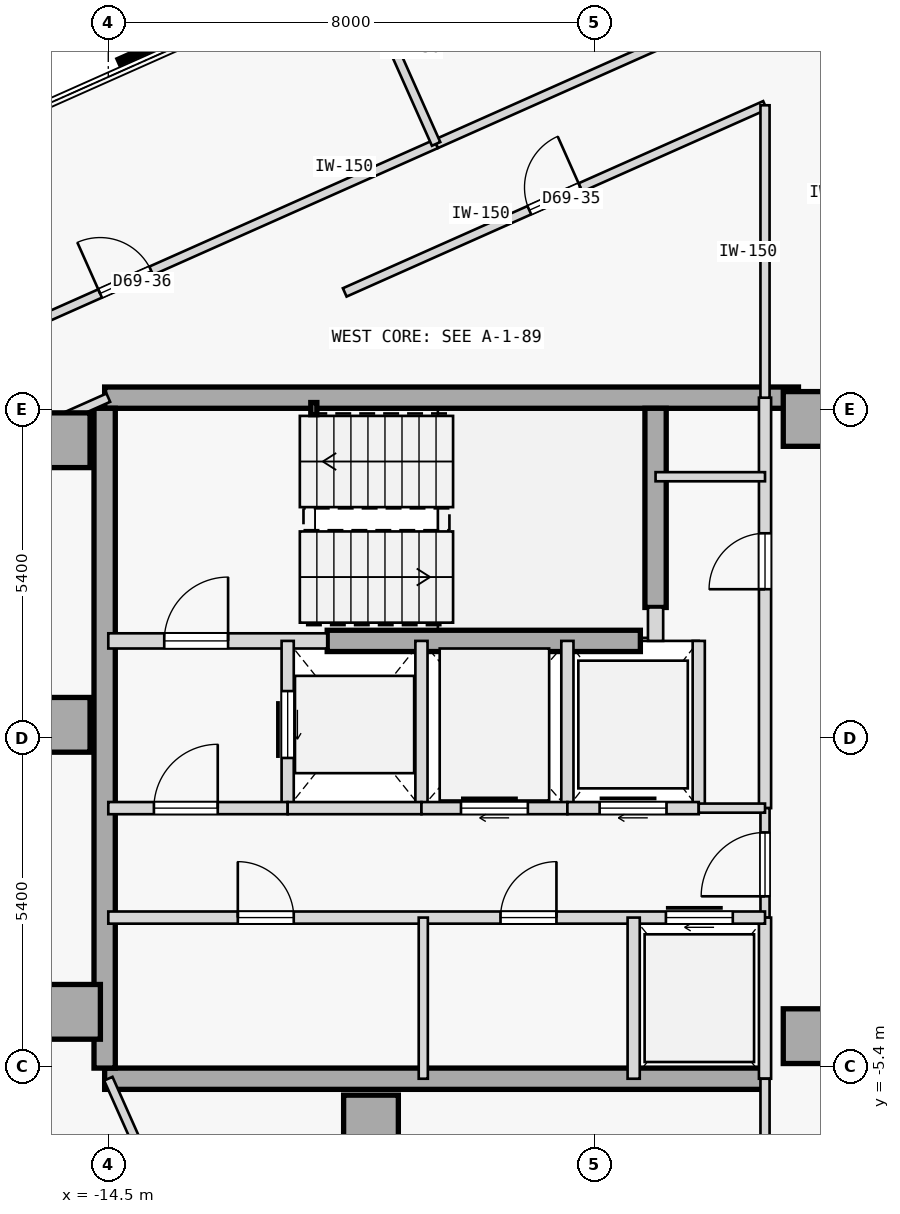
"""IFC4 building model, lengths in metres.
Left out: names, types, materials, properties, quantities, classifications, styles, units other than length and angle.
Written with IfcOpenShell. Run it as: python <this file> out.ifc"""

import sys

from ifc_helpers import new_model, si_unit, direction, frame, frame_2d, origin, origin_2d, place, context, subcontext, project, spatial, rectangle, hollow_rectangle, extrude, element, fill, save


model = new_model("IFC4")
c1 = context("Model", 3, precision=1e-05, world=origin(), true_north=direction((0.0, 1.0)))
c2 = subcontext(c1, "Body", "Model", "MODEL_VIEW")
j1 = project(units=[si_unit("LENGTHUNIT", "METRE"), si_unit("PLANEANGLEUNIT", "RADIAN")], contexts=[c1])
p1 = place(None, origin())
s1 = spatial("IfcSite", under=j1, at=p1, CompositionType="ELEMENT")
p2 = place(p1, origin())
s2 = spatial("IfcBuilding", under=s1, at=p2, CompositionType="ELEMENT")
p3 = place(p2, frame((0.0, 0.0, 258.85)))
s3 = spatial("IfcBuildingStorey", under=s2, at=p3, CompositionType="ELEMENT", Elevation=258.85)
for number, where, z_axis, x_axis in (
    (1, (-15.25, 4.9, 0.0), (0.0, 0.0, 1.0), (1.0, 0.0, 0.0)),
    (2, (-15.25, 0.22, 0.0), (0.0, 0.0, 1.0), (1.0, 0.0, 0.0)),
    (3, (-15.08, -4.5, 0.0), (0.0, 0.0, 1.0), (1.0, 0.0, 0.0)),
    (4, (-10.18, -6.32, 0.0), (0.0, 0.0, 1.0), (1.0, 0.0, 0.0)),
    (5, (-2.95, -4.9, 0.0), (0.0, 0.0, 1.0), (1.0, 0.0, 0.0)),
    (6, (-2.95, 5.25, 0.0), (0.0, 0.0, 1.0), (1.0, 0.0, 0.0)),
):
    element("IfcColumn", number, at=place(p3, frame(where, z_axis=z_axis, x_axis=x_axis)), inside=s3, PredefinedType="COLUMN", context=c2, shape_type="SweptSolid", body=[
        extrude(rectangle(XDim=0.9, YDim=0.9, at=origin_2d()), origin(), (0.0, 0.0, 1.0), 3.35),
    ])
p4 = place(p3, frame((-14.56, 5.6, 0.0), z_axis=(0.0, 0.0, 1.0), x_axis=(1.0, 0.0, 0.0)))
e7 = element("IfcWall", 7, at=p4, inside=s3, PredefinedType="SHEAR", context=c2, shape_type="SweptSolid", body=[
    extrude(rectangle(XDim=11.41, YDim=0.35, at=frame_2d((5.705, 0.0))), origin(), (0.0, 0.0, 1.0), 3.125),
])
p5 = place(p3, frame((-14.56, -5.6, 0.0), z_axis=(0.0, 0.0, 1.0), x_axis=(1.0, 0.0, 0.0)))
e8 = element("IfcWall", 8, at=p5, inside=s3, PredefinedType="SHEAR", context=c2, shape_type="SweptSolid", body=[
    extrude(rectangle(XDim=10.86, YDim=0.35, at=frame_2d((5.43, 0.0))), origin(), (0.0, 0.0, 1.0), 3.125),
])
p6 = place(p3, frame((-14.56, -5.425, 0.0), z_axis=(0.0, 0.0, 1.0), x_axis=(0.0, 1.0, 0.0)))
e9 = element("IfcWall", 9, at=p6, inside=s3, PredefinedType="SHEAR", context=c2, shape_type="SweptSolid", body=[
    extrude(rectangle(XDim=10.85, YDim=0.35, at=frame_2d((5.425, 0.0))), origin(), (0.0, 0.0, 1.0), 3.125),
])
p7 = place(p3, frame((-5.5, 2.15, 0.0), z_axis=(0.0, 0.0, 1.0), x_axis=(0.0, 1.0, 0.0)))
e10 = element("IfcWall", 10, at=p7, inside=s3, PredefinedType="SHEAR", context=c2, shape_type="SweptSolid", body=[
    extrude(rectangle(XDim=3.275, YDim=0.35, at=frame_2d((1.638, 0.0))), origin(), (0.0, 0.0, 1.0), 3.125),
])
p8 = place(p3, frame((-10.9, 1.6, 0.0), z_axis=(0.0, 0.0, 1.0), x_axis=(1.0, 0.0, 0.0)))
e11 = element("IfcWall", 11, at=p8, inside=s3, PredefinedType="SHEAR", context=c2, shape_type="SweptSolid", body=[
    extrude(rectangle(XDim=5.15, YDim=0.35, at=frame_2d((2.575, 0.0))), origin(), (0.0, 0.0, 1.0), 3.125),
])
p9 = place(p3, frame((-11.12, 5.42, 0.0), z_axis=(0.0, 0.0, 1.0), x_axis=(1.0, 0.0, 0.0)))
e12 = element("IfcColumn", 12, at=p9, inside=s3, PredefinedType="COLUMN", context=c2, shape_type="SweptSolid", body=[
    extrude(hollow_rectangle(XDim=0.1, YDim=0.2, WallThickness=0.008, at=origin_2d()), origin(), (0.0, 0.0, 1.0), 3.35),
])
p10 = place(p3, frame((-14.5, 1.6, 0.0), z_axis=(0.0, 0.0, 1.0), x_axis=(1.0, 0.0, 0.0)))
e13 = element("IfcWall", 13, at=p10, inside=s3, PredefinedType="STANDARD", context=c2, shape_type="SweptSolid", body=[
    extrude(rectangle(XDim=3.6, YDim=0.25, at=frame_2d((1.8, 0.0))), origin(), (0.0, 0.0, 1.0), 3.125),
])
p11 = place(p10, frame((0.92, 0.0, 0.0)))
e14 = element("IfcOpeningElement", 14, at=p11, cuts=e13, PredefinedType="OPENING", context=c2, shape_type="SweptSolid", body=[
    extrude(rectangle(XDim=1.05, YDim=2.15, at=frame_2d((0.525, 1.075))), frame((0.0, 0.135, 0.0), z_axis=(0.0, -1.0, 0.0), x_axis=(1.0, 0.0, 0.0)), (0.0, 0.0, 1.0), 0.27),
])
p12 = place(p3, frame((-5.5, 1.6, 0.0), z_axis=(0.0, 0.0, 1.0), x_axis=(0.0, 1.0, 0.0)))
e15 = element("IfcWall", 15, at=p12, inside=s3, PredefinedType="STANDARD", context=c2, shape_type="SweptSolid", body=[
    extrude(rectangle(XDim=0.55, YDim=0.25, at=frame_2d((0.275, 0.0))), origin(), (0.0, 0.0, 1.0), 3.125),
])
p13 = place(p3, frame((-3.7, -1.15, 0.0), z_axis=(0.0, 0.0, 1.0), x_axis=(0.0, 1.0, 0.0)))
e16 = element("IfcWall", 16, at=p13, inside=s3, PredefinedType="STANDARD", context=c2, shape_type="SweptSolid", body=[
    extrude(rectangle(XDim=6.75, YDim=0.2, at=frame_2d((3.375, 0.0))), origin(), (0.0, 0.0, 1.0), 3.125),
])
p14 = place(p13, frame((3.6, 0.0, 0.0)))
e17 = element("IfcOpeningElement", 17, at=p14, cuts=e16, PredefinedType="OPENING", context=c2, shape_type="SweptSolid", body=[
    extrude(rectangle(XDim=0.92, YDim=2.15, at=frame_2d((0.46, 1.075))), frame((0.0, 0.11, 0.0), z_axis=(0.0, -1.0, 0.0), x_axis=(1.0, 0.0, 0.0)), (0.0, 0.0, 1.0), 0.22),
])
p15 = place(p3, frame((-3.7, -2.95, 0.0), z_axis=(0.0, 0.0, 1.0), x_axis=(0.0, 1.0, 0.0)))
e18 = element("IfcWall", 18, at=p15, inside=s3, PredefinedType="PARTITIONING", context=c2, shape_type="SweptSolid", body=[
    extrude(rectangle(XDim=1.8, YDim=0.15, at=frame_2d((0.9, 0.0))), origin(), (0.0, 0.0, 1.0), 3.125),
])
p16 = place(p15, frame((0.35, 0.0, 0.0)))
e19 = element("IfcOpeningElement", 19, at=p16, cuts=e18, PredefinedType="OPENING", context=c2, shape_type="SweptSolid", body=[
    extrude(rectangle(XDim=1.05, YDim=2.18, at=frame_2d((0.525, 1.09))), frame((0.0, 0.085, 0.0), z_axis=(0.0, -1.0, 0.0), x_axis=(1.0, 0.0, 0.0)), (0.0, 0.0, 1.0), 0.17),
])
p17 = place(p3, frame((-3.7, -5.6, 0.0), z_axis=(0.0, 0.0, 1.0), x_axis=(0.0, 1.0, 0.0)))
e20 = element("IfcWall", 20, at=p17, inside=s3, PredefinedType="STANDARD", context=c2, shape_type="SweptSolid", body=[
    extrude(rectangle(XDim=2.65, YDim=0.2, at=frame_2d((1.325, 0.0))), origin(), (0.0, 0.0, 1.0), 3.125),
])
p18 = place(p3, frame((-11.55, -1.15, 0.0), z_axis=(0.0, 0.0, 1.0), x_axis=(0.0, 1.0, 0.0)))
e21 = element("IfcWall", 21, at=p18, inside=s3, PredefinedType="STANDARD", context=c2, shape_type="SweptSolid", body=[
    extrude(rectangle(XDim=2.75, YDim=0.2, at=frame_2d((1.375, 0.0))), origin(), (0.0, 0.0, 1.0), 3.125),
])
p19 = place(p18, frame((0.825, 0.0, 0.0)))
e22 = element("IfcOpeningElement", 22, at=p19, cuts=e21, PredefinedType="OPENING", context=c2, shape_type="SweptSolid", body=[
    extrude(rectangle(XDim=1.1, YDim=2.15, at=frame_2d((0.55, 1.075))), frame((0.0, 0.11, 0.0), z_axis=(0.0, -1.0, 0.0), x_axis=(1.0, 0.0, 0.0)), (0.0, 0.0, 1.0), 0.22),
])
p20 = place(p3, frame((-9.35, -1.15, 0.0), z_axis=(0.0, 0.0, 1.0), x_axis=(0.0, 1.0, 0.0)))
e23 = element("IfcWall", 23, at=p20, inside=s3, PredefinedType="STANDARD", context=c2, shape_type="SweptSolid", body=[
    extrude(rectangle(XDim=2.75, YDim=0.2, at=frame_2d((1.375, 0.0))), origin(), (0.0, 0.0, 1.0), 3.125),
])
p21 = place(p3, frame((-14.5, -1.15, 0.0), z_axis=(0.0, 0.0, 1.0), x_axis=(1.0, 0.0, 0.0)))
e24 = element("IfcWall", 24, at=p21, inside=s3, PredefinedType="STANDARD", context=c2, shape_type="SweptSolid", body=[
    extrude(rectangle(XDim=2.95, YDim=0.2, at=frame_2d((1.475, 0.0))), origin(), (0.0, 0.0, 1.0), 3.125),
])
p22 = place(p21, frame((0.75, 0.0, 0.0)))
e25 = element("IfcOpeningElement", 25, at=p22, cuts=e24, PredefinedType="OPENING", context=c2, shape_type="SweptSolid", body=[
    extrude(rectangle(XDim=1.05, YDim=2.18, at=frame_2d((0.525, 1.09))), frame((0.0, 0.11, 0.0), z_axis=(0.0, -1.0, 0.0), x_axis=(1.0, 0.0, 0.0)), (0.0, 0.0, 1.0), 0.22),
])
p23 = place(p3, frame((-11.55, -1.15, 0.0), z_axis=(0.0, 0.0, 1.0), x_axis=(1.0, 0.0, 0.0)))
e26 = element("IfcWall", 26, at=p23, inside=s3, PredefinedType="STANDARD", context=c2, shape_type="SweptSolid", body=[
    extrude(rectangle(XDim=2.2, YDim=0.2, at=frame_2d((1.1, 0.0))), origin(), (0.0, 0.0, 1.0), 3.125),
])
p24 = place(p3, frame((-6.95, -1.15, 0.0), z_axis=(0.0, 0.0, 1.0), x_axis=(0.0, 1.0, 0.0)))
e27 = element("IfcWall", 27, at=p24, inside=s3, PredefinedType="STANDARD", context=c2, shape_type="SweptSolid", body=[
    extrude(rectangle(XDim=2.75, YDim=0.2, at=frame_2d((1.375, 0.0))), origin(), (0.0, 0.0, 1.0), 3.125),
])
p25 = place(p3, frame((-9.35, -1.15, 0.0), z_axis=(0.0, 0.0, 1.0), x_axis=(1.0, 0.0, 0.0)))
e28 = element("IfcWall", 28, at=p25, inside=s3, PredefinedType="STANDARD", context=c2, shape_type="SweptSolid", body=[
    extrude(rectangle(XDim=2.4, YDim=0.2, at=frame_2d((1.2, 0.0))), origin(), (0.0, 0.0, 1.0), 3.125),
])
p26 = place(p25, frame((0.65, 0.0, 0.0)))
e29 = element("IfcOpeningElement", 29, at=p26, cuts=e28, PredefinedType="OPENING", context=c2, shape_type="SweptSolid", body=[
    extrude(rectangle(XDim=1.1, YDim=2.15, at=frame_2d((0.55, 1.075))), frame((0.0, 0.11, 0.0), z_axis=(0.0, -1.0, 0.0), x_axis=(1.0, 0.0, 0.0)), (0.0, 0.0, 1.0), 0.22),
])
p27 = place(p3, frame((-4.79, -1.15, 0.0), z_axis=(0.0, 0.0, 1.0), x_axis=(0.0, 1.0, 0.0)))
e30 = element("IfcWall", 30, at=p27, inside=s3, PredefinedType="STANDARD", context=c2, shape_type="SweptSolid", body=[
    extrude(rectangle(XDim=2.75, YDim=0.2, at=frame_2d((1.375, 0.0))), origin(), (0.0, 0.0, 1.0), 3.125),
])
p28 = place(p3, frame((-6.95, -1.15, 0.0), z_axis=(0.0, 0.0, 1.0), x_axis=(1.0, 0.0, 0.0)))
e31 = element("IfcWall", 31, at=p28, inside=s3, PredefinedType="STANDARD", context=c2, shape_type="SweptSolid", body=[
    extrude(rectangle(XDim=2.16, YDim=0.2, at=frame_2d((1.08, 0.0))), origin(), (0.0, 0.0, 1.0), 3.125),
])
p29 = place(p28, frame((0.53, 0.0, 0.0)))
e32 = element("IfcOpeningElement", 32, at=p29, cuts=e31, PredefinedType="OPENING", context=c2, shape_type="SweptSolid", body=[
    extrude(rectangle(XDim=1.1, YDim=2.15, at=frame_2d((0.55, 1.075))), frame((0.0, 0.11, 0.0), z_axis=(0.0, -1.0, 0.0), x_axis=(1.0, 0.0, 0.0)), (0.0, 0.0, 1.0), 0.22),
])
p30 = place(p3, frame((-4.79, -1.15, 0.0), z_axis=(0.0, 0.0, 1.0), x_axis=(1.0, 0.0, 0.0)))
e33 = element("IfcWall", 33, at=p30, inside=s3, PredefinedType="PARTITIONING", context=c2, shape_type="SweptSolid", body=[
    extrude(rectangle(XDim=1.09, YDim=0.15, at=frame_2d((0.545, 0.0))), origin(), (0.0, 0.0, 1.0), 3.125),
])
p31 = place(p3, frame((-14.5, -2.95, 0.0), z_axis=(0.0, 0.0, 1.0), x_axis=(1.0, 0.0, 0.0)))
e34 = element("IfcWall", 34, at=p31, inside=s3, PredefinedType="STANDARD", context=c2, shape_type="SweptSolid", body=[
    extrude(rectangle(XDim=10.8, YDim=0.2, at=frame_2d((5.4, 0.0))), origin(), (0.0, 0.0, 1.0), 3.125),
])
p32 = place(p31, frame((9.17, 0.0, 0.0)))
e35 = element("IfcOpeningElement", 35, at=p32, cuts=e34, PredefinedType="OPENING", context=c2, shape_type="SweptSolid", body=[
    extrude(rectangle(XDim=1.1, YDim=2.15, at=frame_2d((0.55, 1.075))), frame((0.0, 0.11, 0.0), z_axis=(0.0, -1.0, 0.0), x_axis=(1.0, 0.0, 0.0)), (0.0, 0.0, 1.0), 0.22),
])
p33 = place(p31, frame((2.13, 0.0, 0.0)))
e36 = element("IfcOpeningElement", 36, at=p33, cuts=e34, PredefinedType="OPENING", context=c2, shape_type="SweptSolid", body=[
    extrude(rectangle(XDim=0.92, YDim=2.15, at=frame_2d((0.46, 1.075))), frame((0.0, 0.11, 0.0), z_axis=(0.0, -1.0, 0.0), x_axis=(1.0, 0.0, 0.0)), (0.0, 0.0, 1.0), 0.22),
])
p34 = place(p31, frame((6.45, 0.0, 0.0)))
e37 = element("IfcOpeningElement", 37, at=p34, cuts=e34, PredefinedType="OPENING", context=c2, shape_type="SweptSolid", body=[
    extrude(rectangle(XDim=0.92, YDim=2.15, at=frame_2d((0.46, 1.075))), frame((0.0, 0.11, 0.0), z_axis=(0.0, -1.0, 0.0), x_axis=(1.0, 0.0, 0.0)), (0.0, 0.0, 1.0), 0.22),
])
p35 = place(p3, frame((-5.86, -5.6, 0.0), z_axis=(0.0, 0.0, 1.0), x_axis=(0.0, 1.0, 0.0)))
e38 = element("IfcWall", 38, at=p35, inside=s3, PredefinedType="STANDARD", context=c2, shape_type="SweptSolid", body=[
    extrude(rectangle(XDim=2.65, YDim=0.2, at=frame_2d((1.325, 0.0))), origin(), (0.0, 0.0, 1.0), 3.125),
])
p36 = place(p3, frame((-9.32, -5.6, 0.0), z_axis=(0.0, 0.0, 1.0), x_axis=(0.0, 1.0, 0.0)))
e39 = element("IfcWall", 39, at=p36, inside=s3, PredefinedType="PARTITIONING", context=c2, shape_type="SweptSolid", body=[
    extrude(rectangle(XDim=2.65, YDim=0.15, at=frame_2d((1.325, 0.0))), origin(), (0.0, 0.0, 1.0), 3.125),
])
p37 = place(p3, frame((-5.5, 4.3, 0.0), z_axis=(0.0, 0.0, 1.0), x_axis=(1.0, 0.0, 0.0)))
e40 = element("IfcWall", 40, at=p37, inside=s3, PredefinedType="PARTITIONING", context=c2, shape_type="SweptSolid", body=[
    extrude(rectangle(XDim=1.8, YDim=0.15, at=frame_2d((0.9, 0.0))), origin(), (0.0, 0.0, 1.0), 3.125),
])
p38 = place(p3, frame((-3.7, -9.054, 0.0), z_axis=(0.0, 0.0, 1.0), x_axis=(-7.0671378e-05, 0.999999997503, 0.0)))
e41 = element("IfcWall", 41, at=p38, inside=s3, PredefinedType="PARTITIONING", context=c2, shape_type="SweptSolid", body=[
    extrude(rectangle(XDim=3.455, YDim=0.15, at=frame_2d((1.727, 0.0))), origin(), (0.0, 0.0, 1.0), 3.125),
])
p39 = place(p38, frame((1.267, 0.0, 0.0)))
e42 = element("IfcOpeningElement", 42, at=p39, cuts=e41, PredefinedType="OPENING", context=c2, shape_type="SweptSolid", body=[
    extrude(rectangle(XDim=0.92, YDim=2.15, at=frame_2d((0.46, 1.075))), frame((0.0, 0.085, 0.0), z_axis=(0.0, -1.0, 0.0), x_axis=(1.0, 0.0, 0.0)), (0.0, 0.0, 1.0), 0.17),
])
p40 = place(p3, frame((-18.661, 3.747, 0.0), z_axis=(0.0, 0.0, 1.0), x_axis=(0.913535055583, 0.40676000568, 0.0)))
e43 = element("IfcWall", 43, at=p40, inside=s3, PredefinedType="PARTITIONING", context=c2, shape_type="SweptSolid", body=[
    extrude(rectangle(XDim=4.555, YDim=0.15, at=frame_2d((2.277, 0.0))), origin(), (0.0, 0.0, 1.0), 3.125),
])
p41 = place(p40, frame((1.134, 0.0, 0.0)))
e44 = element("IfcOpeningElement", 44, at=p41, cuts=e43, PredefinedType="OPENING", context=c2, shape_type="SweptSolid", body=[
    extrude(rectangle(XDim=0.92, YDim=2.15, at=frame_2d((0.46, 1.075))), frame((0.0, 0.085, 0.0), z_axis=(0.0, -1.0, 0.0), x_axis=(1.0, 0.0, 0.0)), (0.0, 0.0, 1.0), 0.17),
])
p42 = place(p3, frame((-10.612, 7.331, 0.0), z_axis=(0.0, 0.0, 1.0), x_axis=(0.913543890665, 0.406740162546, 0.0)))
e45 = element("IfcWall", 45, at=p42, inside=s3, PredefinedType="PARTITIONING", context=c2, shape_type="SweptSolid", body=[
    extrude(rectangle(XDim=7.566, YDim=0.15, at=frame_2d((3.783, 0.0))), origin(), (0.0, 0.0, 1.0), 3.125),
])
p43 = place(p42, frame((3.323, 0.0, 0.0)))
e46 = element("IfcOpeningElement", 46, at=p43, cuts=e45, PredefinedType="OPENING", context=c2, shape_type="SweptSolid", body=[
    extrude(rectangle(XDim=0.92, YDim=2.15, at=frame_2d((0.46, 1.075))), frame((0.0, 0.085, 0.0), z_axis=(0.0, -1.0, 0.0), x_axis=(1.0, 0.0, 0.0)), (0.0, 0.0, 1.0), 0.17),
])
p44 = place(p3, frame((-3.7, 5.6, 0.0), z_axis=(0.0, 0.0, 1.0), x_axis=(5.077173e-05, 0.999999998711, 0.0)))
e47 = element("IfcWall", 47, at=p44, inside=s3, PredefinedType="PARTITIONING", context=c2, shape_type="SweptSolid", body=[
    extrude(rectangle(XDim=4.809, YDim=0.15, at=frame_2d((2.404, 0.0))), origin(), (0.0, 0.0, 1.0), 3.125),
])
p45 = place(p3, frame((-19.32, 5.227, 0.0), z_axis=(0.0, 0.0, 1.0), x_axis=(0.913543828741, 0.406740301628, 0.0)))
e48 = element("IfcWall", 48, at=p45, inside=s3, PredefinedType="PARTITIONING", context=c2, shape_type="SweptSolid", body=[
    extrude(rectangle(XDim=11.177, YDim=0.15, at=frame_2d((5.588, 0.0))), origin(), (0.0, 0.0, 1.0), 3.125),
])
p46 = place(p45, frame((5.128, 0.0, 0.0)))
e49 = element("IfcOpeningElement", 49, at=p46, cuts=e48, PredefinedType="OPENING", context=c2, shape_type="SweptSolid", body=[
    extrude(rectangle(XDim=0.92, YDim=2.15, at=frame_2d((0.46, 1.075))), frame((0.0, 0.085, 0.0), z_axis=(0.0, -1.0, 0.0), x_axis=(1.0, 0.0, 0.0)), (0.0, 0.0, 1.0), 0.17),
])
p47 = place(p3, frame((-9.109, 9.773, 0.0), z_axis=(0.0, 0.0, 1.0), x_axis=(0.913545361298, 0.406736859469, 0.0)))
e50 = element("IfcWall", 50, at=p47, inside=s3, PredefinedType="PARTITIONING", context=c2, shape_type="SweptSolid", body=[
    extrude(rectangle(XDim=19.871, YDim=0.15, at=frame_2d((9.936, 0.0))), origin(), (0.0, 0.0, 1.0), 3.125),
])
p48 = place(p47, frame((9.476, 0.0, 0.0)))
e51 = element("IfcOpeningElement", 51, at=p48, cuts=e50, PredefinedType="OPENING", context=c2, shape_type="SweptSolid", body=[
    extrude(rectangle(XDim=0.92, YDim=2.15, at=frame_2d((0.46, 1.075))), frame((0.0, 0.085, 0.0), z_axis=(0.0, -1.0, 0.0), x_axis=(1.0, 0.0, 0.0)), (0.0, 0.0, 1.0), 0.17),
])
p49 = place(p3, frame((-13.017, -8.93, 0.0), z_axis=(0.0, 0.0, 1.0), x_axis=(-0.406722395322, 0.913551801018, 0.0)))
e52 = element("IfcWall", 52, at=p49, inside=s3, PredefinedType="PARTITIONING", context=c2, shape_type="SweptSolid", body=[
    extrude(rectangle(XDim=3.646, YDim=0.15, at=frame_2d((1.823, 0.0))), origin(), (0.0, 0.0, 1.0), 3.125),
])
p50 = place(p3, frame((-9.109, 9.773, 0.0), z_axis=(0.0, 0.0, 1.0), x_axis=(-0.406698002142, 0.913562660716, 0.0)))
e53 = element("IfcWall", 53, at=p50, inside=s3, PredefinedType="PARTITIONING", context=c2, shape_type="SweptSolid", body=[
    extrude(rectangle(XDim=3.198, YDim=0.15, at=frame_2d((1.599, 0.0))), origin(), (0.0, 0.0, 1.0), 3.125),
])
p51 = place(p11, origin())
e54 = element("IfcDoor", 54, at=p51, inside=s3, OperationType="SINGLE_SWING_RIGHT", PredefinedType="DOOR", context=c2, shape_type="SweptSolid", body=[
    extrude(rectangle(XDim=1.05, YDim=2.15, at=frame_2d((0.525, 1.075))), frame((0.0, 0.025, 0.0), z_axis=(0.0, -1.0, 0.0), x_axis=(1.0, 0.0, 0.0)), (0.0, 0.0, 1.0), 0.05),
])
fill(e14, e54)
p52 = place(p22, origin())
e55 = element("IfcDoor", 55, at=p52, inside=s3, OperationType="SINGLE_SWING_RIGHT", PredefinedType="DOOR", context=c2, shape_type="SweptSolid", body=[
    extrude(rectangle(XDim=1.05, YDim=2.18, at=frame_2d((0.525, 1.09))), frame((0.0, 0.025, 0.0), z_axis=(0.0, -1.0, 0.0), x_axis=(1.0, 0.0, 0.0)), (0.0, 0.0, 1.0), 0.05),
])
fill(e25, e55)
p53 = place(p16, origin())
e56 = element("IfcDoor", 56, at=p53, inside=s3, OperationType="SINGLE_SWING_LEFT", PredefinedType="DOOR", context=c2, shape_type="SweptSolid", body=[
    extrude(rectangle(XDim=1.05, YDim=2.18, at=frame_2d((0.525, 1.09))), frame((0.0, 0.025, 0.0), z_axis=(0.0, -1.0, 0.0), x_axis=(1.0, 0.0, 0.0)), (0.0, 0.0, 1.0), 0.05),
])
fill(e19, e56)
p54 = place(p19, origin())
e57 = element("IfcDoor", 57, at=p54, inside=s3, OperationType="SLIDING_TO_RIGHT", PredefinedType="DOOR", context=c2, shape_type="SweptSolid", body=[
    extrude(rectangle(XDim=1.1, YDim=2.15, at=frame_2d((0.55, 1.075))), frame((0.0, 0.025, 0.0), z_axis=(0.0, -1.0, 0.0), x_axis=(1.0, 0.0, 0.0)), (0.0, 0.0, 1.0), 0.05),
])
fill(e22, e57)
p55 = place(p26, origin())
e58 = element("IfcDoor", 58, at=p55, inside=s3, OperationType="SLIDING_TO_RIGHT", PredefinedType="DOOR", context=c2, shape_type="SweptSolid", body=[
    extrude(rectangle(XDim=1.1, YDim=2.15, at=frame_2d((0.55, 1.075))), frame((0.0, 0.025, 0.0), z_axis=(0.0, -1.0, 0.0), x_axis=(1.0, 0.0, 0.0)), (0.0, 0.0, 1.0), 0.05),
])
fill(e29, e58)
p56 = place(p29, origin())
e59 = element("IfcDoor", 59, at=p56, inside=s3, OperationType="SLIDING_TO_RIGHT", PredefinedType="DOOR", context=c2, shape_type="SweptSolid", body=[
    extrude(rectangle(XDim=1.1, YDim=2.15, at=frame_2d((0.55, 1.075))), frame((0.0, 0.025, 0.0), z_axis=(0.0, -1.0, 0.0), x_axis=(1.0, 0.0, 0.0)), (0.0, 0.0, 1.0), 0.05),
])
fill(e32, e59)
p57 = place(p32, origin())
e60 = element("IfcDoor", 60, at=p57, inside=s3, OperationType="SLIDING_TO_RIGHT", PredefinedType="DOOR", context=c2, shape_type="SweptSolid", body=[
    extrude(rectangle(XDim=1.1, YDim=2.15, at=frame_2d((0.55, 1.075))), frame((0.0, 0.025, 0.0), z_axis=(0.0, -1.0, 0.0), x_axis=(1.0, 0.0, 0.0)), (0.0, 0.0, 1.0), 0.05),
])
fill(e35, e60)
p58 = place(p33, origin())
e61 = element("IfcDoor", 61, at=p58, inside=s3, OperationType="SINGLE_SWING_LEFT", PredefinedType="DOOR", context=c2, shape_type="SweptSolid", body=[
    extrude(rectangle(XDim=0.92, YDim=2.15, at=frame_2d((0.46, 1.075))), frame((0.0, 0.025, 0.0), z_axis=(0.0, -1.0, 0.0), x_axis=(1.0, 0.0, 0.0)), (0.0, 0.0, 1.0), 0.05),
])
fill(e36, e61)
p59 = place(p34, origin())
e62 = element("IfcDoor", 62, at=p59, inside=s3, OperationType="SINGLE_SWING_RIGHT", PredefinedType="DOOR", context=c2, shape_type="SweptSolid", body=[
    extrude(rectangle(XDim=0.92, YDim=2.15, at=frame_2d((0.46, 1.075))), frame((0.0, 0.025, 0.0), z_axis=(0.0, -1.0, 0.0), x_axis=(1.0, 0.0, 0.0)), (0.0, 0.0, 1.0), 0.05),
])
fill(e37, e62)
p60 = place(p14, origin())
e63 = element("IfcDoor", 63, at=p60, inside=s3, OperationType="SINGLE_SWING_LEFT", PredefinedType="DOOR", context=c2, shape_type="SweptSolid", body=[
    extrude(rectangle(XDim=0.92, YDim=2.15, at=frame_2d((0.46, 1.075))), frame((0.0, 0.025, 0.0), z_axis=(0.0, -1.0, 0.0), x_axis=(1.0, 0.0, 0.0)), (0.0, 0.0, 1.0), 0.05),
])
fill(e17, e63)
p61 = place(p43, origin())
e64 = element("IfcDoor", 64, at=p61, inside=s3, OperationType="SINGLE_SWING_RIGHT", PredefinedType="DOOR", context=c2, shape_type="SweptSolid", body=[
    extrude(rectangle(XDim=0.92, YDim=2.15, at=frame_2d((0.46, 1.075))), frame((0.0, 0.025, 0.0), z_axis=(0.0, -1.0, 0.0), x_axis=(1.0, 0.0, 0.0)), (0.0, 0.0, 1.0), 0.05),
])
fill(e46, e64)
p62 = place(p46, origin())
e65 = element("IfcDoor", 65, at=p62, inside=s3, OperationType="SINGLE_SWING_LEFT", PredefinedType="DOOR", context=c2, shape_type="SweptSolid", body=[
    extrude(rectangle(XDim=0.92, YDim=2.15, at=frame_2d((0.46, 1.075))), frame((0.0, 0.025, 0.0), z_axis=(0.0, -1.0, 0.0), x_axis=(1.0, 0.0, 0.0)), (0.0, 0.0, 1.0), 0.05),
])
fill(e49, e65)
save(model, sys.argv[1])
